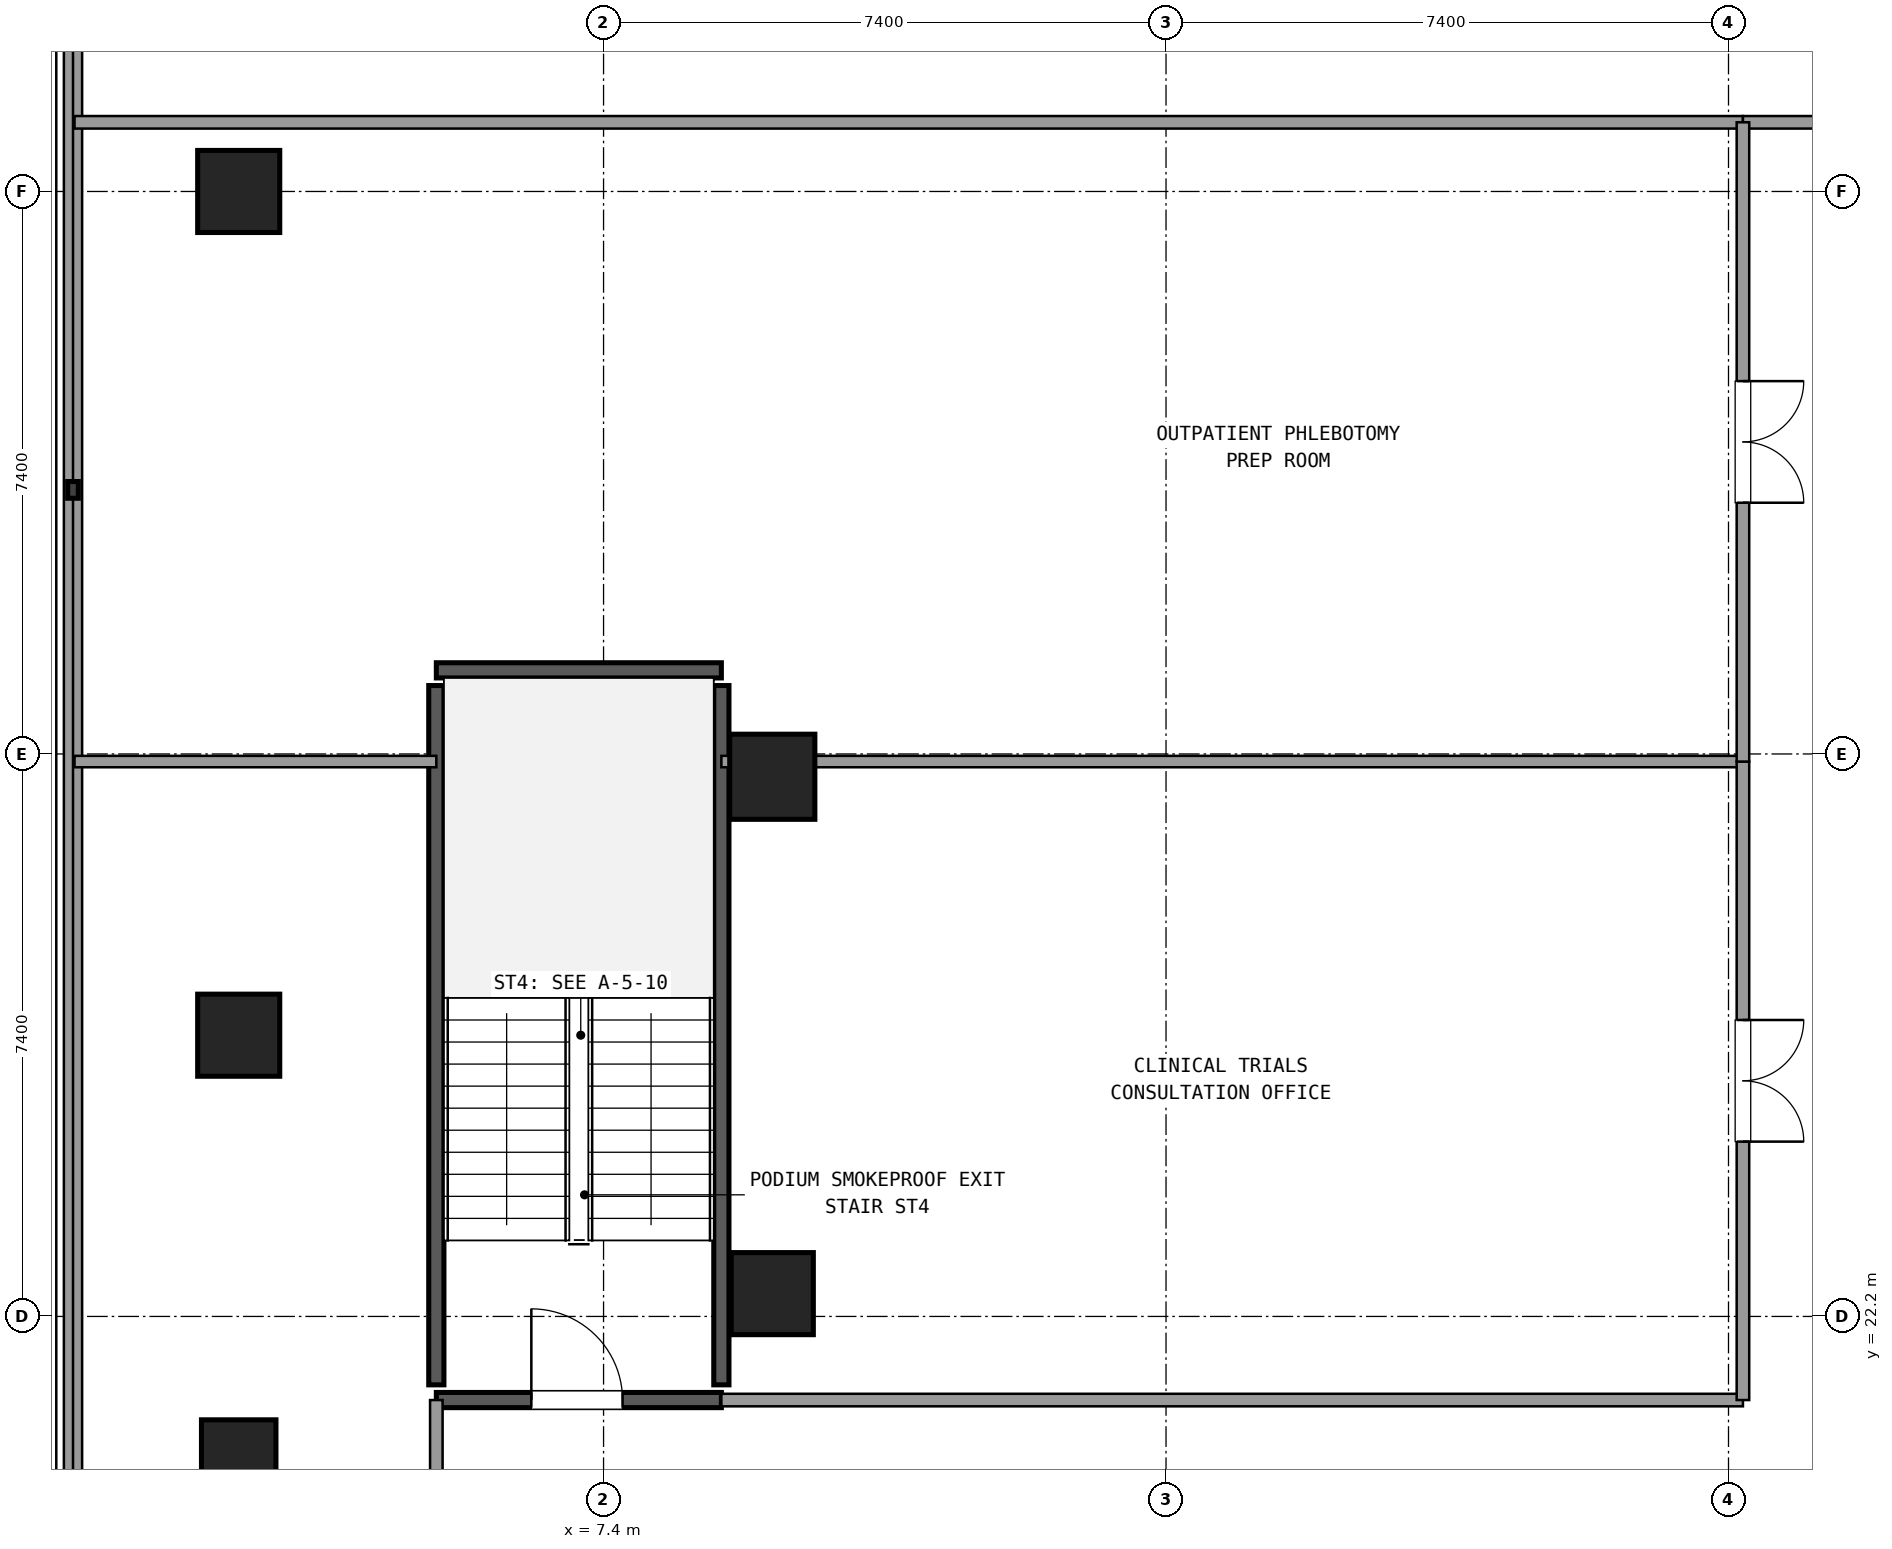
"""IFC4 building model, lengths in metres.
Left out: names, types, materials, properties, quantities, classifications, styles, units other than length and angle.
Written with IfcOpenShell. Run it as: python <this file> out.ifc"""

import sys

from ifc_helpers import new_model, si_unit, direction, frame, frame_2d, origin, origin_2d, place, context, subcontext, project, spatial, rectangle, circle, extrude, element, fill, save


model = new_model("IFC4")
c1 = context("Model", 3, precision=1e-05, world=origin(), true_north=direction((0.0, 1.0)))
c2 = subcontext(c1, "Body", "Model", "MODEL_VIEW")
j1 = project(units=[si_unit("LENGTHUNIT", "METRE"), si_unit("PLANEANGLEUNIT", "RADIAN")], contexts=[c1])
p1 = place(None, origin())
s1 = spatial("IfcSite", under=j1, at=p1, CompositionType="ELEMENT")
p2 = place(p1, origin())
s2 = spatial("IfcBuilding", under=s1, at=p2, CompositionType="ELEMENT")
p3 = place(p2, frame((0.0, 0.0, 5.4)))
s3 = spatial("IfcBuildingStorey", under=s2, at=p3, CompositionType="ELEMENT", Elevation=5.4)
p4 = place(p3, frame((9.62, 22.5, 0.0), z_axis=(0.0, 0.0, 1.0), x_axis=(1.0, 0.0, 0.0)))
e1 = element("IfcColumn", 1, at=p4, inside=s3, PredefinedType="COLUMN", context=c2, shape_type="SweptSolid", body=[
    extrude(rectangle(XDim=1.08, YDim=1.08, at=origin_2d()), origin(), (0.0, 0.0, 1.0), 4.5),
])
p5 = place(p3, frame((9.62, 29.3, 0.0), z_axis=(0.0, 0.0, 1.0), x_axis=(1.0, 0.0, 0.0)))
e2 = element("IfcColumn", 2, at=p5, inside=s3, PredefinedType="COLUMN", context=c2, shape_type="SweptSolid", body=[
    extrude(circle(Radius=0.56, at=origin_2d()), origin(), (0.0, 0.0, 1.0), 4.5),
])
for number, where, z_axis, x_axis in (
    (3, (2.6, 25.9, 0.0), (0.0, 0.0, 1.0), (1.0, 0.0, 0.0)),
    (4, (2.6, 37.0, 0.0), (0.0, 0.0, 1.0), (1.0, 0.0, 0.0)),
):
    element("IfcColumn", number, at=place(p3, frame(where, z_axis=z_axis, x_axis=x_axis)), inside=s3, PredefinedType="COLUMN", context=c2, shape_type="SweptSolid", body=[
        extrude(rectangle(XDim=1.08, YDim=1.08, at=origin_2d()), origin(), (0.0, 0.0, 1.0), 4.5),
    ])
p6 = place(p3, frame((2.6, 20.35, 0.0), z_axis=(0.0, 0.0, 1.0), x_axis=(1.0, 0.0, 0.0)))
e5 = element("IfcColumn", 5, at=p6, inside=s3, PredefinedType="PILASTER", context=c2, shape_type="SweptSolid", body=[
    extrude(circle(Radius=0.49, at=origin_2d()), origin(), (0.0, 0.0, 1.0), 4.5),
])
p7 = place(p3, frame((0.42, 47.421, 0.0), z_axis=(0.0, 0.0, 1.0), x_axis=(0.0, -1.0, 0.0)))
e6 = element("IfcWall", 6, at=p7, inside=s3, PredefinedType="SOLIDWALL", context=c2, shape_type="SweptSolid", body=[
    extrude(rectangle(XDim=43.042, YDim=0.24, at=frame_2d((21.521, 0.0))), origin(), (0.0, 0.0, 1.0), 0.85),
])
p8 = place(p3, frame((5.2, 21.1, 0.0), z_axis=(0.0, 0.0, 1.0), x_axis=(1.0, 0.0, 0.0)))
e7 = element("IfcWall", 7, at=p8, inside=s3, PredefinedType="SHEAR", context=c2, shape_type="SweptSolid", body=[
    extrude(rectangle(XDim=3.75, YDim=0.2, at=frame_2d((1.875, 0.0))), origin(), (0.0, 0.0, 1.0), 4.2),
])
p9 = place(p8, frame((1.25, 0.0, 0.0)))
e8 = element("IfcOpeningElement", 8, at=p9, cuts=e7, PredefinedType="OPENING", context=c2, shape_type="SweptSolid", body=[
    extrude(rectangle(XDim=1.2, YDim=2.15, at=frame_2d((0.6, 1.075))), frame((0.0, 0.11, 0.0), z_axis=(0.0, -1.0, 0.0), x_axis=(1.0, 0.0, 0.0)), (0.0, 0.0, 1.0), 0.22),
])
p10 = place(p3, frame((5.2, 30.7, 0.0), z_axis=(0.0, 0.0, 1.0), x_axis=(1.0, 0.0, 0.0)))
e9 = element("IfcWall", 9, at=p10, inside=s3, PredefinedType="SHEAR", context=c2, shape_type="SweptSolid", body=[
    extrude(rectangle(XDim=3.75, YDim=0.2, at=frame_2d((1.875, 0.0))), origin(), (0.0, 0.0, 1.0), 4.2),
])
for number, where, z_axis, x_axis in (
    (10, (5.2, 21.3, 0.0), (0.0, 0.0, 1.0), (0.0, 1.0, 0.0)),
    (11, (8.95, 21.3, 0.0), (0.0, 0.0, 1.0), (0.0, 1.0, 0.0)),
):
    element("IfcWall", number, at=place(p3, frame(where, z_axis=z_axis, x_axis=x_axis)), inside=s3, PredefinedType="SHEAR", context=c2, shape_type="SweptSolid", body=[
        extrude(rectangle(XDim=9.2, YDim=0.2, at=frame_2d((4.6, 0.0))), origin(), (0.0, 0.0, 1.0), 4.2),
    ])
p11 = place(p3, frame((0.44, 37.91, 0.0), z_axis=(0.0, 0.0, 1.0), x_axis=(1.0, 0.0, 0.0)))
e12 = element("IfcWall", 12, at=p11, inside=s3, PredefinedType="PARTITIONING", context=c2, shape_type="SweptSolid", body=[
    extrude(rectangle(XDim=21.95, YDim=0.165, at=frame_2d((10.975, 0.0))), origin(), (0.0, 0.0, 1.0), 3.21),
])
p12 = place(p3, frame((5.2, 18.17, 0.0), z_axis=(0.0, 0.0, 1.0), x_axis=(0.0, 1.0, 0.0)))
e13 = element("IfcWall", 13, at=p12, inside=s3, PredefinedType="PARTITIONING", context=c2, shape_type="SweptSolid", body=[
    extrude(rectangle(XDim=2.93, YDim=0.165, at=frame_2d((1.465, 0.0))), origin(), (0.0, 0.0, 1.0), 3.21),
])
p13 = place(p3, frame((8.95, 21.1, 0.0), z_axis=(0.0, 0.0, 1.0), x_axis=(1.0, 0.0, 0.0)))
e14 = element("IfcWall", 14, at=p13, inside=s3, PredefinedType="PARTITIONING", context=c2, shape_type="SweptSolid", body=[
    extrude(rectangle(XDim=13.44, YDim=0.165, at=frame_2d((6.72, 0.0))), origin(), (0.0, 0.0, 1.0), 3.21),
])
p14 = place(p3, frame((22.39, 37.91, 0.0), z_axis=(0.0, 0.0, 1.0), x_axis=(1.0, 0.0, 0.0)))
e15 = element("IfcWall", 15, at=p14, inside=s3, PredefinedType="PARTITIONING", context=c2, shape_type="SweptSolid", body=[
    extrude(rectangle(XDim=5.11, YDim=0.165, at=frame_2d((2.555, 0.0))), origin(), (0.0, 0.0, 1.0), 3.21),
])
p15 = place(p14, frame((1.755, 0.0, 0.0)))
e16 = element("IfcOpeningElement", 16, at=p15, cuts=e15, PredefinedType="OPENING", context=c2, shape_type="SweptSolid", body=[
    extrude(rectangle(XDim=1.6, YDim=2.2, at=frame_2d((0.8, 1.1))), frame((0.0, 0.093, 0.0), z_axis=(0.0, -1.0, 0.0), x_axis=(1.0, 0.0, 0.0)), (0.0, 0.0, 1.0), 0.185),
])
p16 = place(p3, frame((8.95, 29.5, 0.0), z_axis=(0.0, 0.0, 1.0), x_axis=(1.0, 0.0, 0.0)))
e17 = element("IfcWall", 17, at=p16, inside=s3, PredefinedType="PARTITIONING", context=c2, shape_type="SweptSolid", body=[
    extrude(rectangle(XDim=13.44, YDim=0.15, at=frame_2d((6.72, 0.0))), origin(), (0.0, 0.0, 1.0), 3.21),
])
p17 = place(p3, frame((5.2, 29.5, 0.0), z_axis=(0.0, 0.0, 1.0), x_axis=(-1.0, 0.0, 0.0)))
e18 = element("IfcWall", 18, at=p17, inside=s3, PredefinedType="PARTITIONING", context=c2, shape_type="SweptSolid", body=[
    extrude(rectangle(XDim=4.76, YDim=0.15, at=frame_2d((2.38, 0.0))), origin(), (0.0, 0.0, 1.0), 3.21),
])
p18 = place(p3, frame((22.39, 21.1, 0.0), z_axis=(0.0, 0.0, 1.0), x_axis=(0.0, 1.0, 0.0)))
e19 = element("IfcWall", 19, at=p18, inside=s3, PredefinedType="PARTITIONING", context=c2, shape_type="SweptSolid", body=[
    extrude(rectangle(XDim=8.4, YDim=0.165, at=frame_2d((4.2, 0.0))), origin(), (0.0, 0.0, 1.0), 3.21),
])
p19 = place(p18, frame((3.4, 0.0, 0.0)))
e20 = element("IfcOpeningElement", 20, at=p19, cuts=e19, PredefinedType="OPENING", context=c2, shape_type="SweptSolid", body=[
    extrude(rectangle(XDim=1.6, YDim=2.2, at=frame_2d((0.8, 1.1))), frame((0.0, 0.093, 0.0), z_axis=(0.0, -1.0, 0.0), x_axis=(1.0, 0.0, 0.0)), (0.0, 0.0, 1.0), 0.185),
])
p20 = place(p3, frame((22.39, 29.5, 0.0), z_axis=(0.0, 0.0, 1.0), x_axis=(0.0, 1.0, 0.0)))
e21 = element("IfcWall", 21, at=p20, inside=s3, PredefinedType="PARTITIONING", context=c2, shape_type="SweptSolid", body=[
    extrude(rectangle(XDim=8.41, YDim=0.165, at=frame_2d((4.205, 0.0))), origin(), (0.0, 0.0, 1.0), 3.21),
])
p21 = place(p20, frame((3.405, 0.0, 0.0)))
e22 = element("IfcOpeningElement", 22, at=p21, cuts=e21, PredefinedType="OPENING", context=c2, shape_type="SweptSolid", body=[
    extrude(rectangle(XDim=1.6, YDim=2.2, at=frame_2d((0.8, 1.1))), frame((0.0, 0.093, 0.0), z_axis=(0.0, -1.0, 0.0), x_axis=(1.0, 0.0, 0.0)), (0.0, 0.0, 1.0), 0.185),
])
p22 = place(p9, origin())
e23 = element("IfcDoor", 23, at=p22, inside=s3, OperationType="SINGLE_SWING_LEFT", PredefinedType="DOOR", context=c2, shape_type="SweptSolid", body=[
    extrude(rectangle(XDim=1.2, YDim=2.15, at=frame_2d((0.6, 1.075))), frame((0.0, 0.025, 0.0), z_axis=(0.0, -1.0, 0.0), x_axis=(1.0, 0.0, 0.0)), (0.0, 0.0, 1.0), 0.05),
])
fill(e8, e23)
p23 = place(p19, frame((1.6, 0.0, 0.0), z_axis=(0.0, 0.0, 1.0), x_axis=(-1.0, 0.0, 0.0)))
e24 = element("IfcDoor", 24, at=p23, inside=s3, OperationType="DOUBLE_DOOR_SINGLE_SWING", PredefinedType="DOOR", context=c2, shape_type="SweptSolid", body=[
    extrude(rectangle(XDim=1.6, YDim=2.2, at=frame_2d((0.8, 1.1))), frame((0.0, 0.025, 0.0), z_axis=(0.0, -1.0, 0.0), x_axis=(1.0, 0.0, 0.0)), (0.0, 0.0, 1.0), 0.05),
])
fill(e20, e24)
p24 = place(p21, frame((1.6, 0.0, 0.0), z_axis=(0.0, 0.0, 1.0), x_axis=(-1.0, 0.0, 0.0)))
e25 = element("IfcDoor", 25, at=p24, inside=s3, OperationType="DOUBLE_DOOR_SINGLE_SWING", PredefinedType="DOOR", context=c2, shape_type="SweptSolid", body=[
    extrude(rectangle(XDim=1.6, YDim=2.2, at=frame_2d((0.8, 1.1))), frame((0.0, 0.025, 0.0), z_axis=(0.0, -1.0, 0.0), x_axis=(1.0, 0.0, 0.0)), (0.0, 0.0, 1.0), 0.05),
])
fill(e22, e25)
save(model, sys.argv[1])
